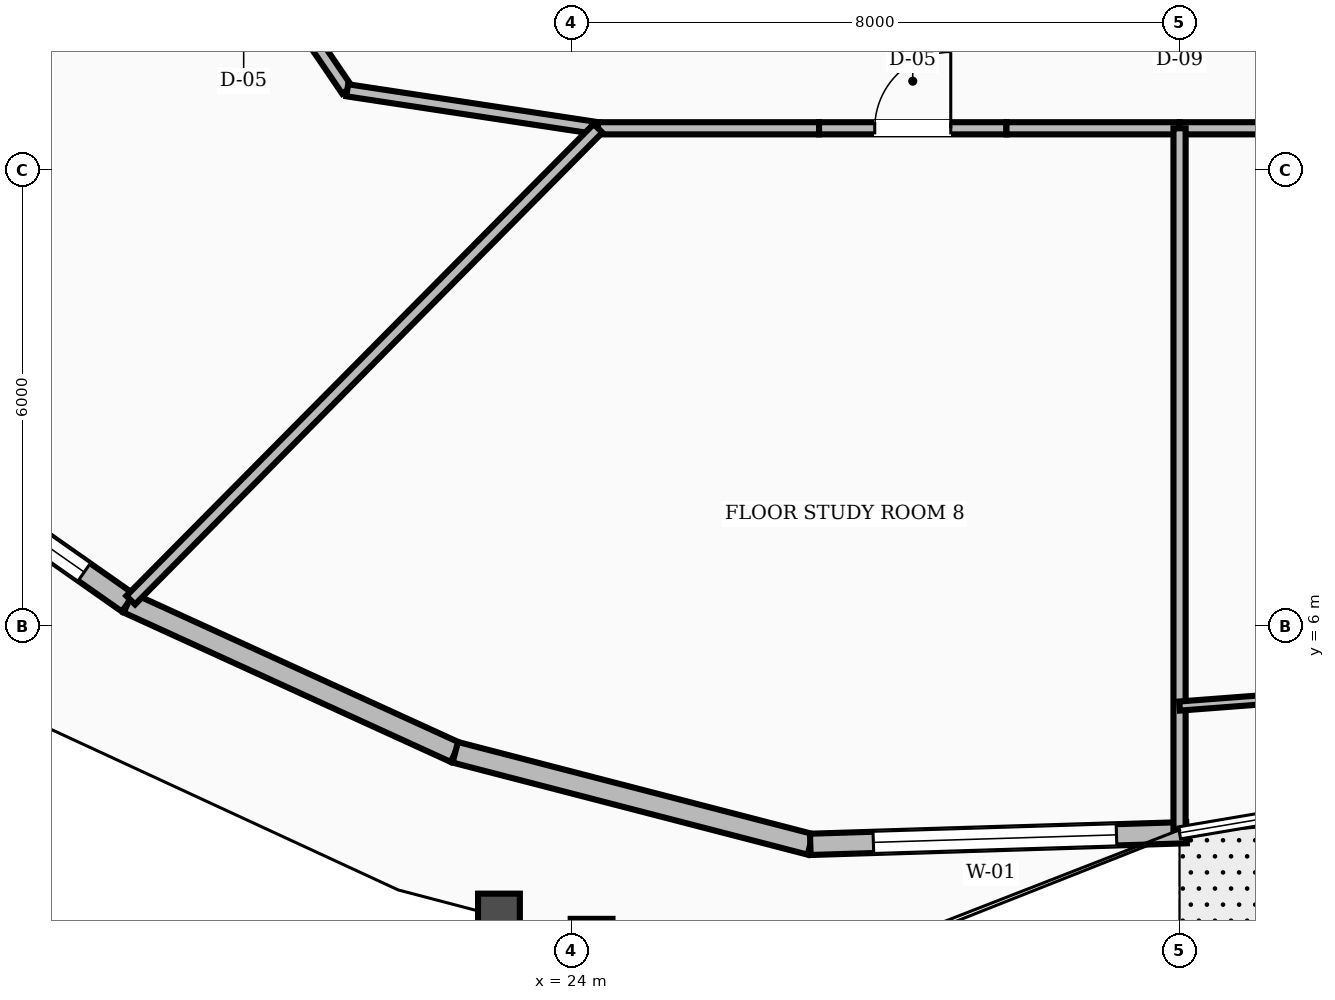
"""IFC4 building model, lengths in metres.
Left out: names, types, materials, properties, quantities, classifications, styles, units other than length and angle.
Written with IfcOpenShell. Run it as: python <this file> out.ifc"""

import sys

from ifc_helpers import new_model, si_unit, direction, frame, frame_2d, origin, place, context, subcontext, project, spatial, rectangle, extrude, element, fill, save


model = new_model("IFC4")
c1 = context("Model", 3, precision=1e-05, world=origin(), true_north=direction((0.0, 1.0)))
c2 = subcontext(c1, "Body", "Model", "MODEL_VIEW")
j1 = project(units=[si_unit("LENGTHUNIT", "METRE"), si_unit("PLANEANGLEUNIT", "RADIAN")], contexts=[c1])
p1 = place(None, origin())
s1 = spatial("IfcSite", under=j1, at=p1, CompositionType="ELEMENT")
p2 = place(p1, origin())
s2 = spatial("IfcBuilding", under=s1, at=p2, CompositionType="ELEMENT")
p3 = place(p2, frame((0.0, 0.0, 192.8)))
s3 = spatial("IfcBuildingStorey", under=s2, at=p3, CompositionType="ELEMENT", Elevation=192.8)
p4 = place(p3, frame((14.393, 8.953, 0.0), z_axis=(0.0, 0.0, 1.0), x_axis=(0.818721405334, -0.574190961657, 0.0)))
e1 = element("IfcWall", 1, at=p4, inside=s3, PredefinedType="STANDARD", context=c2, shape_type="SweptSolid", body=[
    extrude(rectangle(XDim=4.609, YDim=0.28, at=frame_2d((2.304, 0.0))), origin(), (0.0, 0.0, 1.0), 2.82),
])
p5 = place(p4, frame((0.704, 0.0, 0.8)))
e2 = element("IfcOpeningElement", 2, at=p5, cuts=e1, PredefinedType="OPENING", context=c2, shape_type="SweptSolid", body=[
    extrude(rectangle(XDim=3.2, YDim=1.65, at=frame_2d((1.6, 0.825))), frame((0.0, 0.15, 0.0), z_axis=(0.0, -1.0, 0.0), x_axis=(1.0, 0.0, 0.0)), (0.0, 0.0, 1.0), 0.3),
])
p6 = place(p3, frame((18.166, 6.307, 0.0), z_axis=(0.0, 0.0, 1.0), x_axis=(0.909587572303, -0.415512272155, 0.0)))
e3 = element("IfcWall", 3, at=p6, inside=s3, PredefinedType="STANDARD", context=c2, shape_type="SweptSolid", body=[
    extrude(rectangle(XDim=4.733, YDim=0.28, at=frame_2d((2.366, 0.0))), origin(), (0.0, 0.0, 1.0), 2.82),
])
p7 = place(p3, frame((22.471, 4.34, 0.0), z_axis=(0.0, 0.0, 1.0), x_axis=(0.968001905281, -0.250942844833, 0.0)))
e4 = element("IfcWall", 4, at=p7, inside=s3, PredefinedType="STANDARD", context=c2, shape_type="SweptSolid", body=[
    extrude(rectangle(XDim=4.825, YDim=0.28, at=frame_2d((2.413, 0.0))), origin(), (0.0, 0.0, 1.0), 2.82),
])
p8 = place(p3, frame((27.142, 3.129, 0.0), z_axis=(0.0, 0.0, 1.0), x_axis=(0.99951601215, 0.031108543142, 0.0)))
e5 = element("IfcWall", 5, at=p8, inside=s3, PredefinedType="STANDARD", context=c2, shape_type="SweptSolid", body=[
    extrude(rectangle(XDim=4.952, YDim=0.28, at=frame_2d((2.476, 0.0))), origin(), (0.0, 0.0, 1.0), 2.82),
])
p9 = place(p8, frame((0.83, 0.0, 0.8)))
e6 = element("IfcOpeningElement", 6, at=p9, cuts=e5, PredefinedType="OPENING", context=c2, shape_type="SweptSolid", body=[
    extrude(rectangle(XDim=3.2, YDim=1.65, at=frame_2d((1.6, 0.825))), frame((0.0, 0.15, 0.0), z_axis=(0.0, -1.0, 0.0), x_axis=(1.0, 0.0, 0.0)), (0.0, 0.0, 1.0), 0.3),
])
p10 = place(p3, frame((19.35, 15.548, 0.0), z_axis=(0.0, 0.0, 1.0), x_axis=(0.562674669208, -0.826678423955, 0.0)))
e7 = element("IfcWall", 7, at=p10, inside=s3, PredefinedType="SOLIDWALL", context=c2, shape_type="SweptSolid", body=[
    extrude(rectangle(XDim=3.021, YDim=0.16, at=frame_2d((1.511, 0.0))), origin(), (0.0, 0.0, 1.0), 2.8),
])
p11 = place(p10, frame((1.01, 0.0, 0.0)))
e8 = element("IfcOpeningElement", 8, at=p11, cuts=e7, PredefinedType="OPENING", context=c2, shape_type="SweptSolid", body=[
    extrude(rectangle(XDim=1.0, YDim=2.1, at=frame_2d((0.5, 1.05))), frame((0.0, 0.09, 0.0), z_axis=(0.0, -1.0, 0.0), x_axis=(1.0, 0.0, 0.0)), (0.0, 0.0, 1.0), 0.18),
])
p12 = place(p3, frame((21.05, 13.05, 0.0), z_axis=(0.0, 0.0, 1.0), x_axis=(0.988710906508, -0.149835721217, 0.0)))
e9 = element("IfcWall", 9, at=p12, inside=s3, PredefinedType="SOLIDWALL", context=c2, shape_type="SweptSolid", body=[
    extrude(rectangle(XDim=3.337, YDim=0.16, at=frame_2d((1.668, 0.0))), origin(), (0.0, 0.0, 1.0), 2.8),
])
p13 = place(p3, frame((24.349, 12.55, 0.0), z_axis=(0.0, 0.0, 1.0), x_axis=(1.0, 0.0, 0.0)))
e10 = element("IfcWall", 10, at=p13, inside=s3, PredefinedType="SOLIDWALL", context=c2, shape_type="SweptSolid", body=[
    extrude(rectangle(XDim=2.908, YDim=0.16, at=frame_2d((1.454, 0.0))), origin(), (0.0, 0.0, 1.0), 2.8),
])
p14 = place(p3, frame((27.257, 12.55, 0.0), z_axis=(0.0, 0.0, 1.0), x_axis=(1.0, 0.0, 0.0)))
e11 = element("IfcWall", 11, at=p14, inside=s3, PredefinedType="SOLIDWALL", context=c2, shape_type="SweptSolid", body=[
    extrude(rectangle(XDim=2.465, YDim=0.16, at=frame_2d((1.232, 0.0))), origin(), (0.0, 0.0, 1.0), 2.8),
])
p15 = place(p14, frame((0.733, 0.0, 0.0)))
e12 = element("IfcOpeningElement", 12, at=p15, cuts=e11, PredefinedType="OPENING", context=c2, shape_type="SweptSolid", body=[
    extrude(rectangle(XDim=1.0, YDim=2.1, at=frame_2d((0.5, 1.05))), frame((0.0, 0.09, 0.0), z_axis=(0.0, -1.0, 0.0), x_axis=(1.0, 0.0, 0.0)), (0.0, 0.0, 1.0), 0.18),
])
for number, where, z_axis, x_axis in (
    (13, (29.722, 12.55, 0.0), (0.0, 0.0, 1.0), (1.0, 0.0, 0.0)),
    (14, (32.0, 12.55, 0.0), (0.0, 0.0, 1.0), (1.0, 0.0, 0.0)),
):
    element("IfcWall", number, at=place(p3, frame(where, z_axis=z_axis, x_axis=x_axis)), inside=s3, PredefinedType="SOLIDWALL", context=c2, shape_type="SweptSolid", body=[
        extrude(rectangle(XDim=2.278, YDim=0.16, at=frame_2d((1.139, 0.0))), origin(), (0.0, 0.0, 1.0), 2.8),
    ])
p16 = place(p3, frame((24.349, 12.55, 0.0), z_axis=(0.0, 0.0, 1.0), x_axis=(-0.703675406186, -0.710521584985, 0.0)))
e15 = element("IfcWall", 15, at=p16, inside=s3, PredefinedType="SOLIDWALL", context=c2, shape_type="SweptSolid", body=[
    extrude(rectangle(XDim=8.737, YDim=0.16, at=frame_2d((4.368, 0.0))), origin(), (0.0, 0.0, 1.0), 2.8),
])
p17 = place(p3, frame((32.0, 12.55, 0.0), z_axis=(0.0, 0.0, 1.0), x_axis=(0.0, -1.0, 0.0)))
e16 = element("IfcWall", 16, at=p17, inside=s3, PredefinedType="SOLIDWALL", context=c2, shape_type="SweptSolid", body=[
    extrude(rectangle(XDim=9.219, YDim=0.16, at=frame_2d((4.61, 0.0))), origin(), (0.0, 0.0, 1.0), 2.8),
])
p18 = place(p3, frame((32.0, 4.949, 0.0), z_axis=(0.0, 0.0, 1.0), x_axis=(0.997140363468, 0.075571790651, 0.0)))
e17 = element("IfcWall", 17, at=p18, inside=s3, PredefinedType="PARTITIONING", context=c2, shape_type="SweptSolid", body=[
    extrude(rectangle(XDim=4.316, YDim=0.12, at=frame_2d((2.158, 0.0))), origin(), (0.0, 0.0, 1.0), 2.8),
])
p19 = place(p18, frame((1.683, 0.0, 0.0)))
e18 = element("IfcOpeningElement", 18, at=p19, cuts=e17, PredefinedType="OPENING", context=c2, shape_type="SweptSolid", body=[
    extrude(rectangle(XDim=0.95, YDim=2.1, at=frame_2d((0.475, 1.05))), frame((0.0, 0.07, 0.0), z_axis=(0.0, -1.0, 0.0), x_axis=(1.0, 0.0, 0.0)), (0.0, 0.0, 1.0), 0.14),
])
p20 = place(p5, origin())
e19 = element("IfcWindow", 19, at=p20, inside=s3, PartitioningType="SINGLE_PANEL", PredefinedType="WINDOW", context=c2, shape_type="SweptSolid", body=[
    extrude(rectangle(XDim=3.2, YDim=1.65, at=frame_2d((1.6, 0.825))), frame((0.0, 0.03, 0.0), z_axis=(0.0, -1.0, 0.0), x_axis=(1.0, 0.0, 0.0)), (0.0, 0.0, 1.0), 0.06),
])
fill(e2, e19)
p21 = place(p9, origin())
e20 = element("IfcWindow", 20, at=p21, inside=s3, PartitioningType="SINGLE_PANEL", PredefinedType="WINDOW", context=c2, shape_type="SweptSolid", body=[
    extrude(rectangle(XDim=3.2, YDim=1.65, at=frame_2d((1.6, 0.825))), frame((0.0, 0.03, 0.0), z_axis=(0.0, -1.0, 0.0), x_axis=(1.0, 0.0, 0.0)), (0.0, 0.0, 1.0), 0.06),
])
fill(e6, e20)
p22 = place(p15, origin())
e21 = element("IfcDoor", 21, at=p22, inside=s3, OperationType="SINGLE_SWING_RIGHT", PredefinedType="DOOR", context=c2, shape_type="SweptSolid", body=[
    extrude(rectangle(XDim=1.0, YDim=2.1, at=frame_2d((0.5, 1.05))), frame((0.0, 0.025, 0.0), z_axis=(0.0, -1.0, 0.0), x_axis=(1.0, 0.0, 0.0)), (0.0, 0.0, 1.0), 0.05),
])
fill(e12, e21)
save(model, sys.argv[1])
